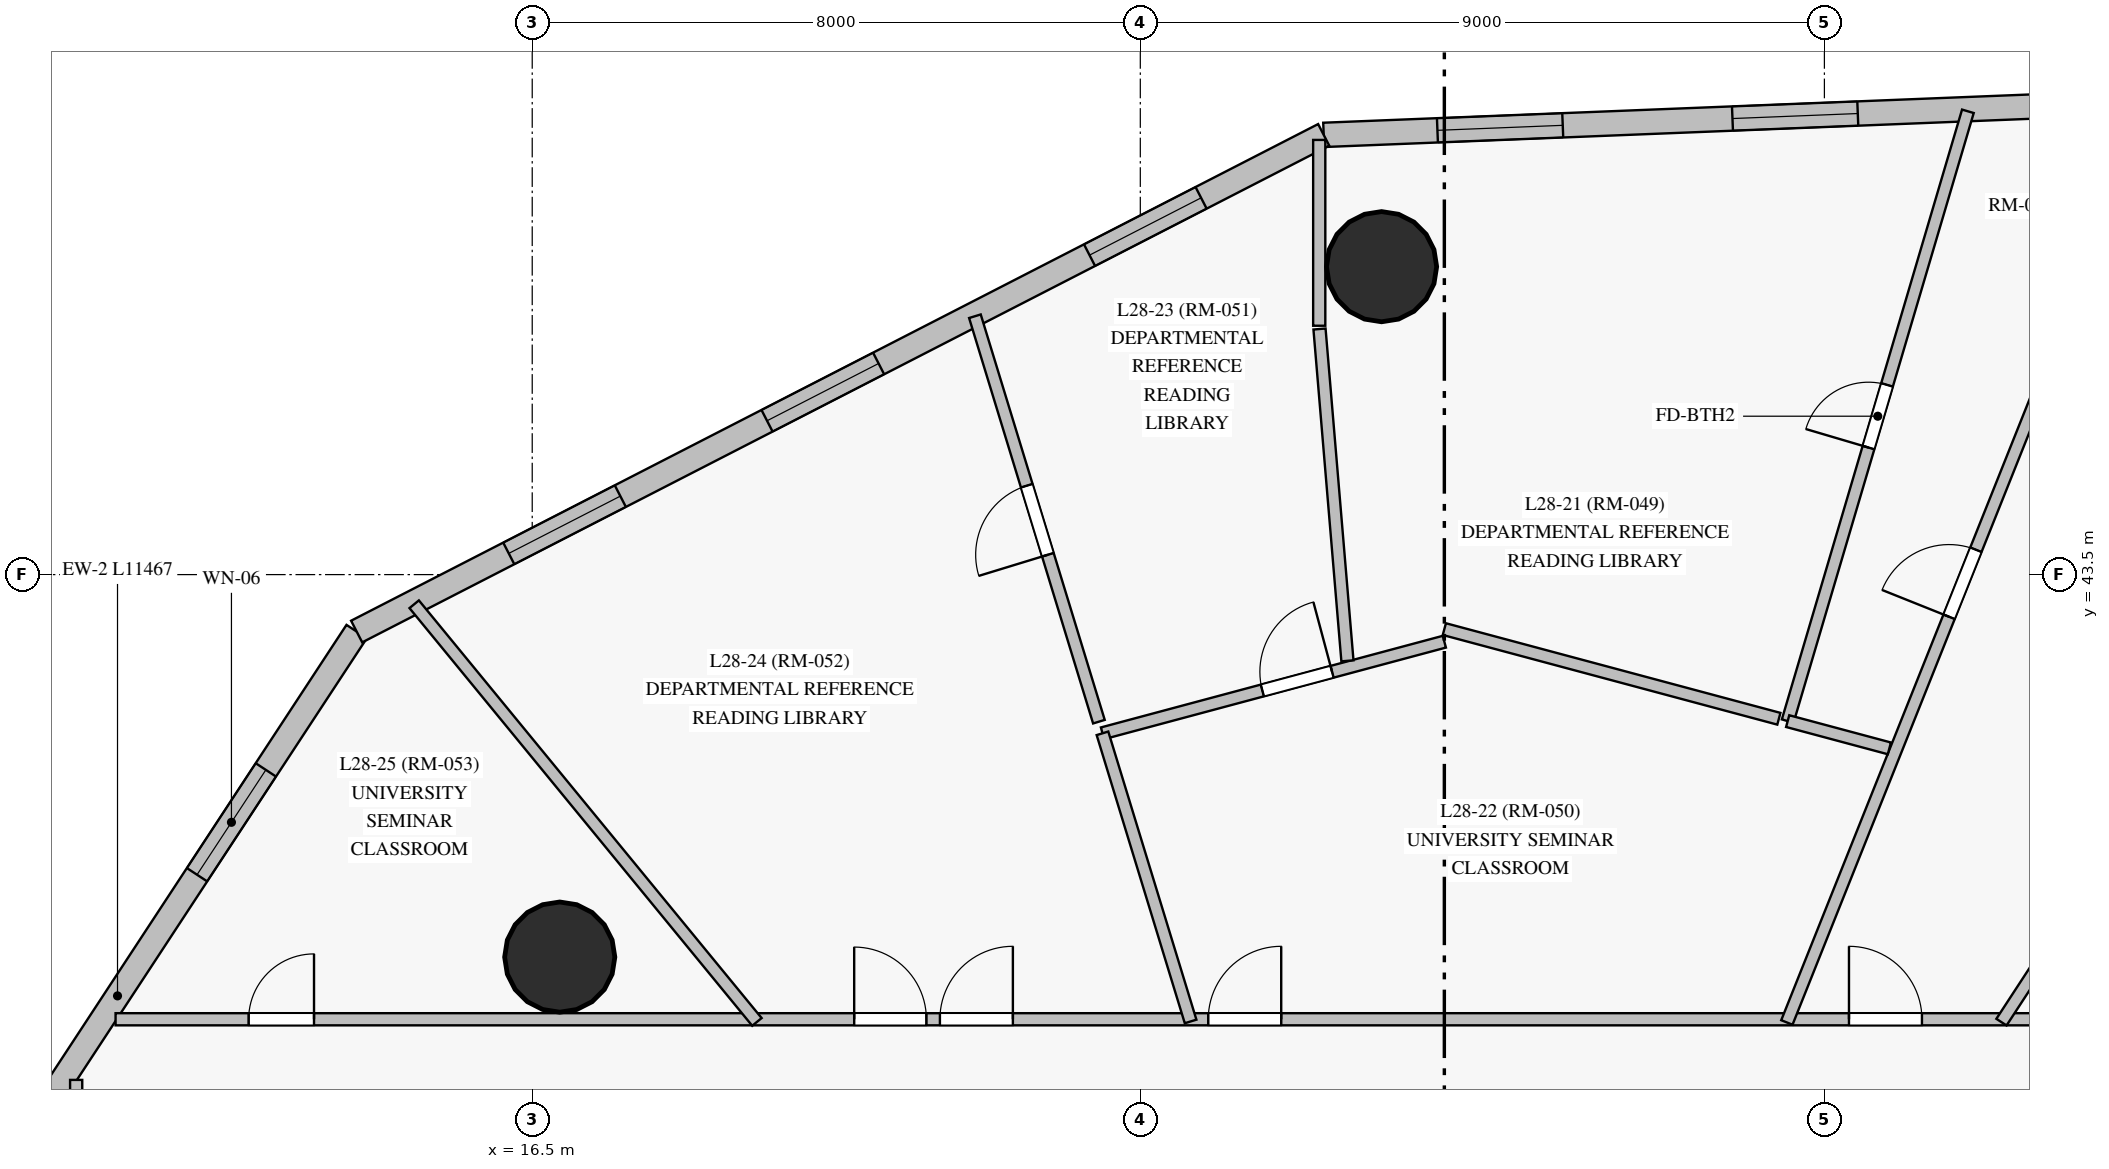
"""IFC4 building model, lengths in metres.
Left out: names, types, materials, properties, quantities, classifications, styles, units other than length and angle.
Written with IfcOpenShell. Run it as: python <this file> out.ifc"""

import sys

from ifc_helpers import new_model, si_unit, direction, frame, frame_2d, origin, origin_with_axes, origin_2d, place, context, subcontext, project, spatial, rectangle, circle, extrude, source, transform, mapped, element, fill, save


model = new_model("IFC4")
c1 = context("Model", 3, precision=1e-05, world=origin(), true_north=direction((0.0, 1.0)))
c2 = subcontext(c1, "Body", "Model", "MODEL_VIEW")
j1 = project(units=[si_unit("LENGTHUNIT", "METRE"), si_unit("PLANEANGLEUNIT", "RADIAN")], contexts=[c1])
p1 = place(None, origin())
s1 = spatial("IfcSite", under=j1, at=p1, CompositionType="ELEMENT")
p2 = place(p1, origin())
s2 = spatial("IfcBuilding", under=s1, at=p2, CompositionType="ELEMENT")
p3 = place(p2, frame((0.0, 0.0, 105.35)))
s3 = spatial("IfcBuildingStorey", under=s2, at=p3, CompositionType="ELEMENT", Elevation=105.35)
m1 = source(origin_with_axes(), c2, "Body", "SweptSolid", [
    extrude(circle(Radius=0.725, at=origin_2d()), origin(), (0.0, 0.0, 1.0), 3.05),
])
for number, where, z_axis, x_axis in (
    (1, (27.674, 47.551, 0.0), (0.0, 0.0, 1.0), (1.0, 0.0, 0.0)),
    (2, (16.862, 38.468, 0.0), (0.0, 0.0, 1.0), (1.0, 0.0, 0.0)),
):
    element("IfcColumn", number, at=place(p3, frame(where, z_axis=z_axis, x_axis=x_axis)), inside=s3, PredefinedType="COLUMN", context=c2, shape_type="MappedRepresentation", body=[
        mapped(m1, transform((0.0, 0.0, 0.0), scale=1.0)),
    ])
p4 = place(p3, frame((14.19, 42.751, 0.0), z_axis=(0.0, 0.0, 1.0), x_axis=(-0.548741077454, -0.835992362354, 0.0)))
e3 = element("IfcWall", 3, at=p4, inside=s3, PredefinedType="SOLIDWALL", context=c2, shape_type="SweptSolid", body=[
    extrude(rectangle(XDim=11.467, YDim=0.32, at=frame_2d((5.733, 0.0))), origin(), (0.0, 0.0, 1.0), 2.825),
])
p5 = place(p4, frame((2.177, 0.0, 0.85)))
e4 = element("IfcOpeningElement", 4, at=p5, cuts=e3, PredefinedType="OPENING", context=c2, shape_type="SweptSolid", body=[
    extrude(rectangle(XDim=1.65, YDim=1.65, at=frame_2d((0.825, 0.825))), frame((0.0, 0.17, 0.0), z_axis=(0.0, -1.0, 0.0), x_axis=(1.0, 0.0, 0.0)), (0.0, 0.0, 1.0), 0.34),
])
p6 = place(p4, frame((8.424, 0.0, 0.85)))
e5 = element("IfcOpeningElement", 5, at=p6, cuts=e3, PredefinedType="OPENING", context=c2, shape_type="SweptSolid", body=[
    extrude(rectangle(XDim=1.65, YDim=1.65, at=frame_2d((0.825, 0.825))), frame((0.0, 0.17, 0.0), z_axis=(0.0, -1.0, 0.0), x_axis=(1.0, 0.0, 0.0)), (0.0, 0.0, 1.0), 0.34),
])
p7 = place(p3, frame((36.783, 49.679, 0.0), z_axis=(0.0, 0.0, 1.0), x_axis=(-0.999202063829, -0.039940401087, 0.0)))
e6 = element("IfcWall", 6, at=p7, inside=s3, PredefinedType="SOLIDWALL", context=c2, shape_type="SweptSolid", body=[
    extrude(rectangle(XDim=9.878, YDim=0.32, at=frame_2d((4.939, 0.0))), origin(), (0.0, 0.0, 1.0), 2.825),
])
p8 = place(p7, frame((2.846, 0.0, 0.85)))
e7 = element("IfcOpeningElement", 7, at=p8, cuts=e6, PredefinedType="OPENING", context=c2, shape_type="SweptSolid", body=[
    extrude(rectangle(XDim=1.65, YDim=1.65, at=frame_2d((0.825, 0.825))), frame((0.0, 0.17, 0.0), z_axis=(0.0, -1.0, 0.0), x_axis=(1.0, 0.0, 0.0)), (0.0, 0.0, 1.0), 0.34),
])
p9 = place(p7, frame((6.731, 0.0, 0.85)))
e8 = element("IfcOpeningElement", 8, at=p9, cuts=e6, PredefinedType="OPENING", context=c2, shape_type="SweptSolid", body=[
    extrude(rectangle(XDim=1.65, YDim=1.65, at=frame_2d((0.825, 0.825))), frame((0.0, 0.17, 0.0), z_axis=(0.0, -1.0, 0.0), x_axis=(1.0, 0.0, 0.0)), (0.0, 0.0, 1.0), 0.34),
])
p10 = place(p3, frame((26.913, 49.285, 0.0), z_axis=(0.0, 0.0, 1.0), x_axis=(-0.889547707618, -0.456842287745, 0.0)))
e9 = element("IfcWall", 9, at=p10, inside=s3, PredefinedType="SOLIDWALL", context=c2, shape_type="SweptSolid", body=[
    extrude(rectangle(XDim=14.302, YDim=0.32, at=frame_2d((7.151, 0.0))), origin(), (0.0, 0.0, 1.0), 2.825),
])
p11 = place(p10, frame((1.813, 0.0, 0.85)))
e10 = element("IfcOpeningElement", 10, at=p11, cuts=e9, PredefinedType="OPENING", context=c2, shape_type="SweptSolid", body=[
    extrude(rectangle(XDim=1.65, YDim=1.65, at=frame_2d((0.825, 0.825))), frame((0.0, 0.17, 0.0), z_axis=(0.0, -1.0, 0.0), x_axis=(1.0, 0.0, 0.0)), (0.0, 0.0, 1.0), 0.34),
])
p12 = place(p10, frame((6.583, 0.0, 0.85)))
e11 = element("IfcOpeningElement", 11, at=p12, cuts=e9, PredefinedType="OPENING", context=c2, shape_type="SweptSolid", body=[
    extrude(rectangle(XDim=1.65, YDim=1.65, at=frame_2d((0.825, 0.825))), frame((0.0, 0.17, 0.0), z_axis=(0.0, -1.0, 0.0), x_axis=(1.0, 0.0, 0.0)), (0.0, 0.0, 1.0), 0.34),
])
p13 = place(p10, frame((10.403, 0.0, 0.85)))
e12 = element("IfcOpeningElement", 12, at=p13, cuts=e9, PredefinedType="OPENING", context=c2, shape_type="SweptSolid", body=[
    extrude(rectangle(XDim=1.65, YDim=1.65, at=frame_2d((0.825, 0.825))), frame((0.0, 0.17, 0.0), z_axis=(0.0, -1.0, 0.0), x_axis=(1.0, 0.0, 0.0)), (0.0, 0.0, 1.0), 0.34),
])
p14 = place(p3, frame((11.018, 37.65, 0.0), z_axis=(0.0, 0.0, 1.0), x_axis=(1.0, 0.0, 0.0)))
e13 = element("IfcWall", 13, at=p14, inside=s3, PredefinedType="PARTITIONING", context=c2, shape_type="SweptSolid", body=[
    extrude(rectangle(XDim=29.232, YDim=0.16, at=frame_2d((14.616, 0.0))), origin(), (0.0, 0.0, 1.0), 2.325),
])
p15 = place(p14, frame((26.519, 0.0, 0.0)))
e14 = element("IfcOpeningElement", 14, at=p15, cuts=e13, PredefinedType="OPENING", context=c2, shape_type="SweptSolid", body=[
    extrude(rectangle(XDim=0.95, YDim=2.15, at=frame_2d((0.475, 1.075))), frame((0.0, 0.09, 0.0), z_axis=(0.0, -1.0, 0.0), x_axis=(1.0, 0.0, 0.0)), (0.0, 0.0, 1.0), 0.18),
])
p16 = place(p14, frame((25.426, 0.0, 0.0)))
e15 = element("IfcOpeningElement", 15, at=p16, cuts=e13, PredefinedType="OPENING", context=c2, shape_type="SweptSolid", body=[
    extrude(rectangle(XDim=0.95, YDim=2.15, at=frame_2d((0.475, 1.075))), frame((0.0, 0.09, 0.0), z_axis=(0.0, -1.0, 0.0), x_axis=(1.0, 0.0, 0.0)), (0.0, 0.0, 1.0), 0.18),
])
p17 = place(p14, frame((22.805, 0.0, 0.0)))
e16 = element("IfcOpeningElement", 16, at=p17, cuts=e13, PredefinedType="OPENING", context=c2, shape_type="SweptSolid", body=[
    extrude(rectangle(XDim=0.96, YDim=2.15, at=frame_2d((0.48, 1.075))), frame((0.0, 0.09, 0.0), z_axis=(0.0, -1.0, 0.0), x_axis=(1.0, 0.0, 0.0)), (0.0, 0.0, 1.0), 0.18),
])
p18 = place(p14, frame((14.375, 0.0, 0.0)))
e17 = element("IfcOpeningElement", 17, at=p18, cuts=e13, PredefinedType="OPENING", context=c2, shape_type="SweptSolid", body=[
    extrude(rectangle(XDim=0.96, YDim=2.15, at=frame_2d((0.48, 1.075))), frame((0.0, 0.09, 0.0), z_axis=(0.0, -1.0, 0.0), x_axis=(1.0, 0.0, 0.0)), (0.0, 0.0, 1.0), 0.18),
])
p19 = place(p14, frame((9.717, 0.0, 0.0)))
e18 = element("IfcOpeningElement", 18, at=p19, cuts=e13, PredefinedType="OPENING", context=c2, shape_type="SweptSolid", body=[
    extrude(rectangle(XDim=0.95, YDim=2.15, at=frame_2d((0.475, 1.075))), frame((0.0, 0.09, 0.0), z_axis=(0.0, -1.0, 0.0), x_axis=(1.0, 0.0, 0.0)), (0.0, 0.0, 1.0), 0.18),
])
p20 = place(p14, frame((10.845, 0.0, 0.0)))
e19 = element("IfcOpeningElement", 19, at=p20, cuts=e13, PredefinedType="OPENING", context=c2, shape_type="SweptSolid", body=[
    extrude(rectangle(XDim=0.96, YDim=2.15, at=frame_2d((0.48, 1.075))), frame((0.0, 0.09, 0.0), z_axis=(0.0, -1.0, 0.0), x_axis=(1.0, 0.0, 0.0)), (0.0, 0.0, 1.0), 0.18),
])
p21 = place(p14, frame((1.751, 0.0, 0.0)))
e20 = element("IfcOpeningElement", 20, at=p21, cuts=e13, PredefinedType="OPENING", context=c2, shape_type="SweptSolid", body=[
    extrude(rectangle(XDim=0.86, YDim=2.04, at=frame_2d((0.43, 1.02))), frame((0.0, 0.09, 0.0), z_axis=(0.0, -1.0, 0.0), x_axis=(1.0, 0.0, 0.0)), (0.0, 0.0, 1.0), 0.18),
])
p22 = place(p3, frame((10.5, 15.35, 0.0), z_axis=(0.0, 0.0, 1.0), x_axis=(0.0, 1.0, 0.0)))
e21 = element("IfcWall", 21, at=p22, inside=s3, PredefinedType="PARTITIONING", context=c2, shape_type="SweptSolid", body=[
    extrude(rectangle(XDim=21.502, YDim=0.16, at=frame_2d((10.751, 0.0))), origin(), (0.0, 0.0, 1.0), 2.825),
])
p23 = place(p22, frame((9.556, 0.0, 0.0)))
e22 = element("IfcOpeningElement", 22, at=p23, cuts=e21, PredefinedType="OPENING", context=c2, shape_type="SweptSolid", body=[
    extrude(rectangle(XDim=0.96, YDim=2.15, at=frame_2d((0.48, 1.075))), frame((0.0, 0.09, 0.0), z_axis=(0.0, -1.0, 0.0), x_axis=(1.0, 0.0, 0.0)), (0.0, 0.0, 1.0), 0.18),
])
p24 = place(p22, frame((13.397, 0.0, 0.0)))
e23 = element("IfcOpeningElement", 23, at=p24, cuts=e21, PredefinedType="OPENING", context=c2, shape_type="SweptSolid", body=[
    extrude(rectangle(XDim=0.95, YDim=2.15, at=frame_2d((0.475, 1.075))), frame((0.0, 0.09, 0.0), z_axis=(0.0, -1.0, 0.0), x_axis=(1.0, 0.0, 0.0)), (0.0, 0.0, 1.0), 0.18),
])
p25 = place(p3, frame((33.007, 37.608, 0.0), z_axis=(0.0, 0.0, 1.0), x_axis=(0.371289618401, 0.928517107687, 0.0)))
e24 = element("IfcWall", 24, at=p25, inside=s3, PredefinedType="PARTITIONING", context=c2, shape_type="SweptSolid", body=[
    extrude(rectangle(XDim=12.496, YDim=0.16, at=frame_2d((6.248, 0.0))), origin(), (0.0, 0.0, 1.0), 2.825),
])
p26 = place(p25, frame((5.748, 0.0, 0.0)))
e25 = element("IfcOpeningElement", 25, at=p26, cuts=e24, PredefinedType="OPENING", context=c2, shape_type="SweptSolid", body=[
    extrude(rectangle(XDim=0.95, YDim=2.15, at=frame_2d((0.475, 1.075))), frame((0.0, 0.09, 0.0), z_axis=(0.0, -1.0, 0.0), x_axis=(1.0, 0.0, 0.0)), (0.0, 0.0, 1.0), 0.18),
])
p27 = place(p3, frame((35.83, 37.612, 0.0), z_axis=(0.0, 0.0, 1.0), x_axis=(0.546828428928, 0.837244689034, 0.0)))
e26 = element("IfcWall", 26, at=p27, inside=s3, PredefinedType="PARTITIONING", context=c2, shape_type="SweptSolid", body=[
    extrude(rectangle(XDim=11.222, YDim=0.16, at=frame_2d((5.611, 0.0))), origin(), (0.0, 0.0, 1.0), 2.825),
])
p28 = place(p3, frame((33.017, 41.573, 0.0), z_axis=(0.0, 0.0, 1.0), x_axis=(0.283401651714, 0.959001305424, 0.0)))
e27 = element("IfcWall", 27, at=p28, inside=s3, PredefinedType="PARTITIONING", context=c2, shape_type="SweptSolid", body=[
    extrude(rectangle(XDim=8.366, YDim=0.16, at=frame_2d((4.183, 0.0))), origin(), (0.0, 0.0, 1.0), 2.825),
])
p29 = place(p28, frame((3.753, 0.0, 0.0)))
e28 = element("IfcOpeningElement", 28, at=p29, cuts=e27, PredefinedType="OPENING", context=c2, shape_type="SweptSolid", body=[
    extrude(rectangle(XDim=0.86, YDim=2.04, at=frame_2d((0.43, 1.02))), frame((0.0, 0.09, 0.0), z_axis=(0.0, -1.0, 0.0), x_axis=(1.0, 0.0, 0.0)), (0.0, 0.0, 1.0), 0.18),
])
p30 = place(p3, frame((19.456, 37.615, 0.0), z_axis=(0.0, 0.0, 1.0), x_axis=(-0.634372400503, 0.773027591668, 0.0)))
e29 = element("IfcWall", 29, at=p30, inside=s3, PredefinedType="PARTITIONING", context=c2, shape_type="SweptSolid", body=[
    extrude(rectangle(XDim=7.108, YDim=0.16, at=frame_2d((3.554, 0.0))), origin(), (0.0, 0.0, 1.0), 2.825),
])
p31 = place(p3, frame((23.956, 41.565, 0.0), z_axis=(0.0, 0.0, 1.0), x_axis=(-0.292467613213, 0.956275428536, 0.0)))
e30 = element("IfcWall", 30, at=p31, inside=s3, PredefinedType="PARTITIONING", context=c2, shape_type="SweptSolid", body=[
    extrude(rectangle(XDim=5.578, YDim=0.16, at=frame_2d((2.789, 0.0))), origin(), (0.0, 0.0, 1.0), 2.825),
])
p32 = place(p31, frame((2.296, 0.0, 0.0)))
e31 = element("IfcOpeningElement", 31, at=p32, cuts=e30, PredefinedType="OPENING", context=c2, shape_type="SweptSolid", body=[
    extrude(rectangle(XDim=0.95, YDim=2.15, at=frame_2d((0.475, 1.075))), frame((0.0, 0.09, 0.0), z_axis=(0.0, -1.0, 0.0), x_axis=(1.0, 0.0, 0.0)), (0.0, 0.0, 1.0), 0.18),
])
p33 = place(p3, frame((24.002, 41.412, 0.0), z_axis=(0.0, 0.0, 1.0), x_axis=(0.965931435786, 0.258798109268, 0.0)))
e32 = element("IfcWall", 32, at=p33, inside=s3, PredefinedType="PARTITIONING", context=c2, shape_type="SweptSolid", body=[
    extrude(rectangle(XDim=4.656, YDim=0.16, at=frame_2d((2.328, 0.0))), origin(), (0.0, 0.0, 1.0), 2.325),
])
p34 = place(p33, frame((2.177, 0.0, 0.0)))
e33 = element("IfcOpeningElement", 33, at=p34, cuts=e32, PredefinedType="OPENING", context=c2, shape_type="SweptSolid", body=[
    extrude(rectangle(XDim=0.95, YDim=2.15, at=frame_2d((0.475, 1.075))), frame((0.0, 0.09, 0.0), z_axis=(0.0, -1.0, 0.0), x_axis=(1.0, 0.0, 0.0)), (0.0, 0.0, 1.0), 0.18),
])
p35 = place(p3, frame((32.901, 41.604, 0.0), z_axis=(0.0, 0.0, 1.0), x_axis=(-0.965926524805, 0.25881643819, 0.0)))
e34 = element("IfcWall", 34, at=p35, inside=s3, PredefinedType="PARTITIONING", context=c2, shape_type="SweptSolid", body=[
    extrude(rectangle(XDim=4.556, YDim=0.16, at=frame_2d((2.278, 0.0))), origin(), (0.0, 0.0, 1.0), 2.325),
])
p36 = place(p3, frame((27.225, 42.365, 0.0), z_axis=(0.0, 0.0, 1.0), x_axis=(-0.083870997944, 0.996476620751, 0.0)))
e35 = element("IfcWall", 35, at=p36, inside=s3, PredefinedType="PARTITIONING", context=c2, shape_type="SweptSolid", body=[
    extrude(rectangle(XDim=4.381, YDim=0.16, at=frame_2d((2.19, 0.0))), origin(), (0.0, 0.0, 1.0), 2.225),
])
p37 = place(p3, frame((25.162, 37.621, 0.0), z_axis=(0.0, 0.0, 1.0), x_axis=(-0.292479826773, 0.956271693051, 0.0)))
e36 = element("IfcWall", 36, at=p37, inside=s3, PredefinedType="PARTITIONING", context=c2, shape_type="SweptSolid", body=[
    extrude(rectangle(XDim=3.964, YDim=0.16, at=frame_2d((1.982, 0.0))), origin(), (0.0, 0.0, 1.0), 2.825),
])
p38 = place(p3, frame((26.854, 49.219, 0.0), z_axis=(0.0, 0.0, 1.0), x_axis=(0.0, -1.0, 0.0)))
e37 = element("IfcWall", 37, at=p38, inside=s3, PredefinedType="PARTITIONING", context=c2, shape_type="SweptSolid", body=[
    extrude(rectangle(XDim=2.445, YDim=0.16, at=frame_2d((1.222, 0.0))), origin(), (0.0, 0.0, 1.0), 2.825),
])
p39 = place(p3, frame((34.355, 41.214, 0.0), z_axis=(0.0, 0.0, 1.0), x_axis=(-0.96594175785, 0.258759580387, 0.0)))
e38 = element("IfcWall", 38, at=p39, inside=s3, PredefinedType="PARTITIONING", context=c2, shape_type="SweptSolid", body=[
    extrude(rectangle(XDim=1.385, YDim=0.16, at=frame_2d((0.692, 0.0))), origin(), (0.0, 0.0, 1.0), 2.325),
])
m2 = source(origin_with_axes(), c2, "Body", "SweptSolid", [
    extrude(rectangle(XDim=1.65, YDim=1.65, at=frame_2d((0.825, 0.825))), frame((0.0, 0.03, 0.0), z_axis=(0.0, -1.0, 0.0), x_axis=(1.0, 0.0, 0.0)), (0.0, 0.0, 1.0), 0.06),
])
p40 = place(p5, origin())
e39 = element("IfcWindow", 39, at=p40, inside=s3, PartitioningType="SINGLE_PANEL", PredefinedType="WINDOW", context=c2, shape_type="MappedRepresentation", body=[
    mapped(m2, transform((0.0, 0.0, 0.0), scale=1.0)),
])
fill(e4, e39)
p41 = place(p8, origin())
e40 = element("IfcWindow", 40, at=p41, inside=s3, PartitioningType="SINGLE_PANEL", PredefinedType="WINDOW", context=c2, shape_type="MappedRepresentation", body=[
    mapped(m2, transform((0.0, 0.0, 0.0), scale=1.0)),
])
fill(e7, e40)
p42 = place(p9, origin())
e41 = element("IfcWindow", 41, at=p42, inside=s3, PartitioningType="SINGLE_PANEL", PredefinedType="WINDOW", context=c2, shape_type="MappedRepresentation", body=[
    mapped(m2, transform((0.0, 0.0, 0.0), scale=1.0)),
])
fill(e8, e41)
p43 = place(p11, origin())
e42 = element("IfcWindow", 42, at=p43, inside=s3, PartitioningType="SINGLE_PANEL", PredefinedType="WINDOW", context=c2, shape_type="MappedRepresentation", body=[
    mapped(m2, transform((0.0, 0.0, 0.0), scale=1.0)),
])
fill(e10, e42)
p44 = place(p12, origin())
e43 = element("IfcWindow", 43, at=p44, inside=s3, PartitioningType="SINGLE_PANEL", PredefinedType="WINDOW", context=c2, shape_type="MappedRepresentation", body=[
    mapped(m2, transform((0.0, 0.0, 0.0), scale=1.0)),
])
fill(e11, e43)
p45 = place(p13, origin())
e44 = element("IfcWindow", 44, at=p45, inside=s3, PartitioningType="SINGLE_PANEL", PredefinedType="WINDOW", context=c2, shape_type="MappedRepresentation", body=[
    mapped(m2, transform((0.0, 0.0, 0.0), scale=1.0)),
])
fill(e12, e44)
m3 = source(origin_with_axes(), c2, "Body", "SweptSolid", [
    extrude(rectangle(XDim=0.96, YDim=2.15, at=frame_2d((0.48, 1.075))), frame((0.0, 0.025, 0.0), z_axis=(0.0, -1.0, 0.0), x_axis=(1.0, 0.0, 0.0)), (0.0, 0.0, 1.0), 0.05),
])
p46 = place(p17, origin())
e45 = element("IfcDoor", 45, at=p46, inside=s3, OperationType="SINGLE_SWING_LEFT", PredefinedType="DOOR", context=c2, shape_type="MappedRepresentation", body=[
    mapped(m3, transform((0.0, 0.0, 0.0), scale=1.0)),
])
fill(e16, e45)
p47 = place(p18, origin())
e46 = element("IfcDoor", 46, at=p47, inside=s3, OperationType="SINGLE_SWING_RIGHT", PredefinedType="DOOR", context=c2, shape_type="MappedRepresentation", body=[
    mapped(m3, transform((0.0, 0.0, 0.0), scale=1.0)),
])
fill(e17, e46)
m4 = source(origin_with_axes(), c2, "Body", "SweptSolid", [
    extrude(rectangle(XDim=0.95, YDim=2.15, at=frame_2d((0.475, 1.075))), frame((0.0, 0.025, 0.0), z_axis=(0.0, -1.0, 0.0), x_axis=(1.0, 0.0, 0.0)), (0.0, 0.0, 1.0), 0.05),
])
p48 = place(p19, origin())
e47 = element("IfcDoor", 47, at=p48, inside=s3, OperationType="SINGLE_SWING_LEFT", PredefinedType="DOOR", context=c2, shape_type="MappedRepresentation", body=[
    mapped(m4, transform((0.0, 0.0, 0.0), scale=1.0)),
])
fill(e18, e47)
p49 = place(p20, origin())
e48 = element("IfcDoor", 48, at=p49, inside=s3, OperationType="SINGLE_SWING_RIGHT", PredefinedType="DOOR", context=c2, shape_type="MappedRepresentation", body=[
    mapped(m3, transform((0.0, 0.0, 0.0), scale=1.0)),
])
fill(e19, e48)
p50 = place(p26, origin())
e49 = element("IfcDoor", 49, at=p50, inside=s3, OperationType="SINGLE_SWING_LEFT", PredefinedType="DOOR", context=c2, shape_type="MappedRepresentation", body=[
    mapped(m4, transform((0.0, 0.0, 0.0), scale=1.0)),
])
fill(e25, e49)
p51 = place(p34, origin())
e50 = element("IfcDoor", 50, at=p51, inside=s3, OperationType="SINGLE_SWING_RIGHT", PredefinedType="DOOR", context=c2, shape_type="MappedRepresentation", body=[
    mapped(m4, transform((0.0, 0.0, 0.0), scale=1.0)),
])
fill(e33, e50)
p52 = place(p32, origin())
e51 = element("IfcDoor", 51, at=p52, inside=s3, OperationType="SINGLE_SWING_LEFT", PredefinedType="DOOR", context=c2, shape_type="MappedRepresentation", body=[
    mapped(m4, transform((0.0, 0.0, 0.0), scale=1.0)),
])
fill(e31, e51)
m5 = source(origin_with_axes(), c2, "Body", "SweptSolid", [
    extrude(rectangle(XDim=0.86, YDim=2.04, at=frame_2d((0.43, 1.02))), frame((0.0, 0.025, 0.0), z_axis=(0.0, -1.0, 0.0), x_axis=(1.0, 0.0, 0.0)), (0.0, 0.0, 1.0), 0.05),
])
p53 = place(p29, origin())
e52 = element("IfcDoor", 52, at=p53, inside=s3, OperationType="SINGLE_SWING_LEFT", PredefinedType="DOOR", context=c2, shape_type="MappedRepresentation", body=[
    mapped(m5, transform((0.0, 0.0, 0.0), scale=1.0)),
])
fill(e28, e52)
p54 = place(p21, origin())
e53 = element("IfcDoor", 53, at=p54, inside=s3, OperationType="SINGLE_SWING_RIGHT", PredefinedType="DOOR", context=c2, shape_type="MappedRepresentation", body=[
    mapped(m5, transform((0.0, 0.0, 0.0), scale=1.0)),
])
fill(e20, e53)
save(model, sys.argv[1])
